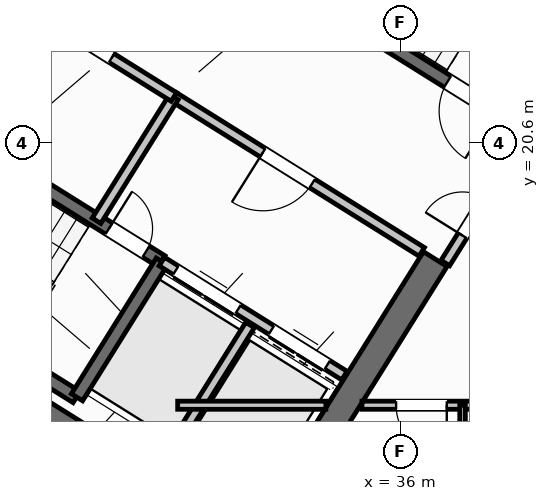
"""IFC4 building model, lengths in metres.
Left out: names, types, materials, properties, quantities, classifications, styles, units other than length and angle.
Written with IfcOpenShell. Run it as: python <this file> out.ifc"""

import sys

from ifc_helpers import new_model, si_unit, direction, frame, frame_2d, origin, place, context, subcontext, project, spatial, rectangle, extrude, source, transform, mapped, element, fill, save


model = new_model("IFC4")
c1 = context("Model", 3, precision=1e-05, world=origin(), true_north=direction((0.0, 1.0)))
c2 = subcontext(c1, "Body", "Model", "MODEL_VIEW")
j1 = project(units=[si_unit("LENGTHUNIT", "METRE"), si_unit("PLANEANGLEUNIT", "RADIAN")], contexts=[c1])
p1 = place(None, origin())
s1 = spatial("IfcSite", under=j1, at=p1, CompositionType="ELEMENT")
p2 = place(p1, origin())
s2 = spatial("IfcBuilding", under=s1, at=p2, CompositionType="ELEMENT")
p3 = place(p2, frame((0.0, 0.0, 165.9)))
s3 = spatial("IfcBuildingStorey", under=s2, at=p3, CompositionType="ELEMENT", Elevation=165.9)
p4 = place(p3, frame((33.366, 12.477, 0.0), z_axis=(0.0, 0.0, 1.0), x_axis=(-0.848047359947, 0.529920442413, 0.0)))
e1 = element("IfcWall", 1, at=p4, inside=s3, PredefinedType="SHEAR", context=c2, shape_type="SweptSolid", body=[
    extrude(rectangle(XDim=13.14, YDim=0.55, at=frame_2d((6.57, 0.0))), origin(), (0.0, 0.0, 1.0), 3.32),
])
p5 = place(p3, frame((36.683, 18.304, 0.0), z_axis=(0.0, 0.0, 1.0), x_axis=(-0.529896466841, -0.848062341122, 0.0)))
e2 = element("IfcWall", 2, at=p5, inside=s3, PredefinedType="SHEAR", context=c2, shape_type="SweptSolid", body=[
    extrude(rectangle(XDim=6.425, YDim=0.55, at=frame_2d((3.212, 0.0))), origin(), (0.0, 0.0, 1.0), 3.32),
])
p6 = place(p3, frame((29.268, 6.429, 0.0), z_axis=(0.0, 0.0, 1.0), x_axis=(-0.848049971435, 0.529916263149, 0.0)))
e3 = element("IfcWall", 3, at=p6, inside=s3, PredefinedType="STANDARD", context=c2, shape_type="SweptSolid", body=[
    extrude(rectangle(XDim=31.588, YDim=0.32, at=frame_2d((15.794, 0.0))), origin(), (0.0, 0.0, 1.0), 3.32),
])
p7 = place(p6, frame((16.362, 0.0, 0.0)))
e4 = element("IfcOpeningElement", 4, at=p7, cuts=e3, PredefinedType="OPENING", context=c2, shape_type="SweptSolid", body=[
    extrude(rectangle(XDim=1.2, YDim=2.15, at=frame_2d((0.6, 1.075))), frame((0.0, 0.17, 0.0), z_axis=(0.0, -1.0, 0.0), x_axis=(1.0, 0.0, 0.0)), (0.0, 0.0, 1.0), 0.34),
])
p8 = place(p6, frame((2.989, 0.0, 0.8)))
e5 = element("IfcOpeningElement", 5, at=p8, cuts=e3, PredefinedType="OPENING", context=c2, shape_type="SweptSolid", body=[
    extrude(rectangle(XDim=2.1, YDim=1.55, at=frame_2d((1.05, 0.775))), frame((0.0, 0.17, 0.0), z_axis=(0.0, -1.0, 0.0), x_axis=(1.0, 0.0, 0.0)), (0.0, 0.0, 1.0), 0.34),
])
p9 = place(p6, frame((8.359, 0.0, 0.8)))
e6 = element("IfcOpeningElement", 6, at=p9, cuts=e3, PredefinedType="OPENING", context=c2, shape_type="SweptSolid", body=[
    extrude(rectangle(XDim=2.1, YDim=1.55, at=frame_2d((1.05, 0.775))), frame((0.0, 0.17, 0.0), z_axis=(0.0, -1.0, 0.0), x_axis=(1.0, 0.0, 0.0)), (0.0, 0.0, 1.0), 0.34),
])
p10 = place(p6, frame((13.284, 0.0, 0.95)))
e7 = element("IfcOpeningElement", 7, at=p10, cuts=e3, PredefinedType="OPENING", context=c2, shape_type="SweptSolid", body=[
    extrude(rectangle(XDim=1.2, YDim=1.4, at=frame_2d((0.6, 0.7))), frame((0.0, 0.17, 0.0), z_axis=(0.0, -1.0, 0.0), x_axis=(1.0, 0.0, 0.0)), (0.0, 0.0, 1.0), 0.34),
])
p11 = place(p6, frame((20.39, 0.0, 0.95)))
e8 = element("IfcOpeningElement", 8, at=p11, cuts=e3, PredefinedType="OPENING", context=c2, shape_type="SweptSolid", body=[
    extrude(rectangle(XDim=1.2, YDim=1.4, at=frame_2d((0.6, 0.7))), frame((0.0, 0.17, 0.0), z_axis=(0.0, -1.0, 0.0), x_axis=(1.0, 0.0, 0.0)), (0.0, 0.0, 1.0), 0.34),
])
p12 = place(p6, frame((23.715, 0.0, 1.0)))
e9 = element("IfcOpeningElement", 9, at=p12, cuts=e3, PredefinedType="OPENING", context=c2, shape_type="SweptSolid", body=[
    extrude(rectangle(XDim=0.9, YDim=1.25, at=frame_2d((0.45, 0.625))), frame((0.0, 0.17, 0.0), z_axis=(0.0, -1.0, 0.0), x_axis=(1.0, 0.0, 0.0)), (0.0, 0.0, 1.0), 0.34),
])
p13 = place(p6, frame((26.106, 0.0, 0.85)))
e10 = element("IfcOpeningElement", 10, at=p13, cuts=e3, PredefinedType="OPENING", context=c2, shape_type="SweptSolid", body=[
    extrude(rectangle(XDim=1.5, YDim=1.5, at=frame_2d((0.75, 0.75))), frame((0.0, 0.17, 0.0), z_axis=(0.0, -1.0, 0.0), x_axis=(1.0, 0.0, 0.0)), (0.0, 0.0, 1.0), 0.34),
])
p14 = place(p6, frame((29.068, 0.0, 0.85)))
e11 = element("IfcOpeningElement", 11, at=p14, cuts=e3, PredefinedType="OPENING", context=c2, shape_type="SweptSolid", body=[
    extrude(rectangle(XDim=1.8, YDim=1.5, at=frame_2d((0.9, 0.75))), frame((0.0, 0.17, 0.0), z_axis=(0.0, -1.0, 0.0), x_axis=(1.0, 0.0, 0.0)), (0.0, 0.0, 1.0), 0.34),
])
p15 = place(p3, frame((29.605, 15.581, 0.0), z_axis=(0.0, 0.0, 1.0), x_axis=(-0.848036911448, 0.529937163087, 0.0)))
e12 = element("IfcWall", 12, at=p15, inside=s3, PredefinedType="SHEAR", context=c2, shape_type="SweptSolid", body=[
    extrude(rectangle(XDim=7.46, YDim=0.26, at=frame_2d((3.73, 0.0))), origin(), (0.0, 0.0, 1.0), 3.32),
])
p16 = place(p3, frame((31.28, 18.261, 0.0), z_axis=(0.0, 0.0, 1.0), x_axis=(-0.848051618787, 0.529913626805, 0.0)))
e13 = element("IfcWall", 13, at=p16, inside=s3, PredefinedType="SHEAR", context=c2, shape_type="SweptSolid", body=[
    extrude(rectangle(XDim=7.46, YDim=0.26, at=frame_2d((3.73, 0.0))), origin(), (0.0, 0.0, 1.0), 3.32),
])
p17 = place(p16, frame((0.36, 0.0, 0.0)))
e14 = element("IfcOpeningElement", 14, at=p17, cuts=e13, PredefinedType="OPENING", context=c2, shape_type="SweptSolid", body=[
    extrude(rectangle(XDim=0.86, YDim=2.05, at=frame_2d((0.43, 1.025))), frame((0.0, 0.14, 0.0), z_axis=(0.0, -1.0, 0.0), x_axis=(1.0, 0.0, 0.0)), (0.0, 0.0, 1.0), 0.28),
])
p18 = place(p3, frame((31.288, 18.256, 0.0), z_axis=(0.0, 0.0, 1.0), x_axis=(-0.529943379326, -0.848033026897, 0.0)))
e15 = element("IfcWall", 15, at=p18, inside=s3, PredefinedType="SHEAR", context=c2, shape_type="SweptSolid", body=[
    extrude(rectangle(XDim=3.16, YDim=0.26, at=frame_2d((1.58, 0.0))), origin(), (0.0, 0.0, 1.0), 3.32),
])
p19 = place(p3, frame((38.046, 21.108, 0.0), z_axis=(0.0, 0.0, 1.0), x_axis=(-0.848054434086, 0.529909121291, 0.0)))
e16 = element("IfcWall", 16, at=p19, inside=s3, PredefinedType="SHEAR", context=c2, shape_type="SweptSolid", body=[
    extrude(rectangle(XDim=7.33, YDim=0.26, at=frame_2d((3.665, 0.0))), origin(), (0.0, 0.0, 1.0), 3.32),
])
p20 = place(p19, frame((0.22, 0.0, 0.0)))
e17 = element("IfcOpeningElement", 17, at=p20, cuts=e16, PredefinedType="OPENING", context=c2, shape_type="SweptSolid", body=[
    extrude(rectangle(XDim=1.1, YDim=2.1, at=frame_2d((0.55, 1.05))), frame((0.0, 0.14, 0.0), z_axis=(0.0, -1.0, 0.0), x_axis=(1.0, 0.0, 0.0)), (0.0, 0.0, 1.0), 0.28),
])
p21 = place(p3, frame((34.891, 16.005, 0.0), z_axis=(0.0, 0.0, 1.0), x_axis=(-0.848062873452, 0.529895614884, 0.0)))
e18 = element("IfcWall", 18, at=p21, inside=s3, PredefinedType="STANDARD", context=c2, shape_type="SweptSolid", body=[
    extrude(rectangle(XDim=4.248, YDim=0.2, at=frame_2d((2.124, 0.0))), origin(), (0.0, 0.0, 1.0), 3.31),
])
p22 = place(p21, frame((0.398, 0.0, 0.0)))
e19 = element("IfcOpeningElement", 19, at=p22, cuts=e18, PredefinedType="OPENING", context=c2, shape_type="SweptSolid", body=[
    extrude(rectangle(XDim=1.3, YDim=2.2, at=frame_2d((0.65, 1.1))), frame((0.0, 0.11, 0.0), z_axis=(0.0, -1.0, 0.0), x_axis=(1.0, 0.0, 0.0)), (0.0, 0.0, 1.0), 0.22),
])
p23 = place(p21, frame((2.473, 0.0, 0.0)))
e20 = element("IfcOpeningElement", 20, at=p23, cuts=e18, PredefinedType="OPENING", context=c2, shape_type="SweptSolid", body=[
    extrude(rectangle(XDim=1.45, YDim=2.25, at=frame_2d((0.725, 1.125))), frame((0.0, 0.11, 0.0), z_axis=(0.0, -1.0, 0.0), x_axis=(1.0, 0.0, 0.0)), (0.0, 0.0, 1.0), 0.22),
])
p24 = place(p3, frame((36.417, 18.447, 0.0), z_axis=(0.0, 0.0, 1.0), x_axis=(-0.848064879198, 0.529892404805, 0.0)))
e21 = element("IfcWall", 21, at=p24, inside=s3, PredefinedType="STANDARD", context=c2, shape_type="SweptSolid", body=[
    extrude(rectangle(XDim=5.768, YDim=0.2, at=frame_2d((2.884, 0.0))), origin(), (0.0, 0.0, 1.0), 3.31),
])
p25 = place(p24, frame((2.548, 0.0, 0.0)))
e22 = element("IfcOpeningElement", 22, at=p25, cuts=e21, PredefinedType="OPENING", context=c2, shape_type="SweptSolid", body=[
    extrude(rectangle(XDim=1.15, YDim=2.1, at=frame_2d((0.575, 1.05))), frame((0.0, 0.11, 0.0), z_axis=(0.0, -1.0, 0.0), x_axis=(1.0, 0.0, 0.0)), (0.0, 0.0, 1.0), 0.22),
])
p26 = place(p3, frame((33.029, 17.003, 0.0), z_axis=(0.0, 0.0, 1.0), x_axis=(-0.529916267533, -0.848049968695, 0.0)))
e23 = element("IfcWall", 23, at=p26, inside=s3, PredefinedType="STANDARD", context=c2, shape_type="SweptSolid", body=[
    extrude(rectangle(XDim=2.92, YDim=0.2, at=frame_2d((1.46, 0.0))), origin(), (0.0, 0.0, 1.0), 3.31),
])
p27 = place(p3, frame((31.525, 21.504, 0.0), z_axis=(0.0, 0.0, 1.0), x_axis=(-0.529907497854, -0.848055448493, 0.0)))
e24 = element("IfcWall", 24, at=p27, inside=s3, PredefinedType="STANDARD", context=c2, shape_type="SweptSolid", body=[
    extrude(rectangle(XDim=2.88, YDim=0.2, at=frame_2d((1.44, 0.0))), origin(), (0.0, 0.0, 1.0), 3.31),
])
p28 = place(p3, frame((31.525, 21.504, 0.0), z_axis=(0.0, 0.0, 1.0), x_axis=(-0.848040211232, 0.529931882541, 0.0)))
e25 = element("IfcWall", 25, at=p28, inside=s3, PredefinedType="STANDARD", context=c2, shape_type="SweptSolid", body=[
    extrude(rectangle(XDim=6.218, YDim=0.2, at=frame_2d((3.109, 0.0))), origin(), (0.0, 0.0, 1.0), 3.31),
])
p29 = place(p28, frame((4.4, 0.0, 0.0)))
e26 = element("IfcOpeningElement", 26, at=p29, cuts=e25, PredefinedType="OPENING", context=c2, shape_type="SweptSolid", body=[
    extrude(rectangle(XDim=0.86, YDim=2.05, at=frame_2d((0.43, 1.025))), frame((0.0, 0.11, 0.0), z_axis=(0.0, -1.0, 0.0), x_axis=(1.0, 0.0, 0.0)), (0.0, 0.0, 1.0), 0.22),
])
p30 = place(p28, frame((1.45, 0.0, 0.0)))
e27 = element("IfcOpeningElement", 27, at=p30, cuts=e25, PredefinedType="OPENING", context=c2, shape_type="SweptSolid", body=[
    extrude(rectangle(XDim=0.86, YDim=2.05, at=frame_2d((0.43, 1.025))), frame((0.0, 0.11, 0.0), z_axis=(0.0, -1.0, 0.0), x_axis=(1.0, 0.0, 0.0)), (0.0, 0.0, 1.0), 0.22),
])
p31 = place(p3, frame((32.164, 10.374, 0.0), z_axis=(0.0, 0.0, 1.0), x_axis=(-0.848044107957, 0.529925646633, 0.0)))
e28 = element("IfcWall", 28, at=p31, inside=s3, PredefinedType="PARTITIONING", context=c2, shape_type="SweptSolid", body=[
    extrude(rectangle(XDim=15.57, YDim=0.16, at=frame_2d((7.785, 0.0))), origin(), (0.0, 0.0, 1.0), 3.31),
])
p32 = place(p31, frame((10.83, 0.0, 0.0)))
e29 = element("IfcOpeningElement", 29, at=p32, cuts=e28, PredefinedType="OPENING", context=c2, shape_type="SweptSolid", body=[
    extrude(rectangle(XDim=1.0, YDim=2.1, at=frame_2d((0.5, 1.05))), frame((0.0, 0.09, 0.0), z_axis=(0.0, -1.0, 0.0), x_axis=(1.0, 0.0, 0.0)), (0.0, 0.0, 1.0), 0.18),
])
p33 = place(p3, frame((29.72, 8.859, 0.0), z_axis=(0.0, 0.0, 1.0), x_axis=(-0.848049134363, 0.529917602752, 0.0)))
e30 = element("IfcWall", 30, at=p33, inside=s3, PredefinedType="PLUMBINGWALL", context=c2, shape_type="SweptSolid", body=[
    extrude(rectangle(XDim=14.3, YDim=0.14, at=frame_2d((7.15, 0.0))), origin(), (0.0, 0.0, 1.0), 3.31),
])
p34 = place(p33, frame((9.57, 0.0, 0.0)))
e31 = element("IfcOpeningElement", 31, at=p34, cuts=e30, PredefinedType="OPENING", context=c2, shape_type="SweptSolid", body=[
    extrude(rectangle(XDim=0.92, YDim=2.08, at=frame_2d((0.46, 1.04))), frame((0.0, 0.08, 0.0), z_axis=(0.0, -1.0, 0.0), x_axis=(1.0, 0.0, 0.0)), (0.0, 0.0, 1.0), 0.16),
])
p35 = place(p3, frame((38.451, 20.737, 0.0), z_axis=(0.0, 0.0, 1.0), x_axis=(-0.529924799939, -0.848044637038, 0.0)))
e32 = element("IfcWall", 32, at=p35, inside=s3, PredefinedType="STANDARD", context=c2, shape_type="SweptSolid", body=[
    extrude(rectangle(XDim=2.96, YDim=0.2, at=frame_2d((1.48, 0.0))), origin(), (0.0, 0.0, 1.0), 3.31),
])
p36 = place(p35, frame((1.46, 0.0, 0.0)))
e33 = element("IfcOpeningElement", 33, at=p36, cuts=e32, PredefinedType="OPENING", context=c2, shape_type="SweptSolid", body=[
    extrude(rectangle(XDim=0.86, YDim=2.05, at=frame_2d((0.43, 1.025))), frame((0.0, 0.11, 0.0), z_axis=(0.0, -1.0, 0.0), x_axis=(1.0, 0.0, 0.0)), (0.0, 0.0, 1.0), 0.22),
])
p37 = place(p3, frame((31.6, 15.42, 0.0), z_axis=(0.0, 0.0, 1.0), x_axis=(1.0, 0.0, 0.0)))
e34 = element("IfcWall", 34, at=p37, inside=s3, PredefinedType="PARTITIONING", context=c2, shape_type="SweptSolid", body=[
    extrude(rectangle(XDim=2.925, YDim=0.16, at=frame_2d((1.462, 0.0))), origin(), (0.0, 0.0, 1.0), 3.31),
])
p38 = place(p3, frame((35.237, 15.42, 0.0), z_axis=(0.0, 0.0, 1.0), x_axis=(1.0, 0.0, 0.0)))
e35 = element("IfcWall", 35, at=p38, inside=s3, PredefinedType="PARTITIONING", context=c2, shape_type="SweptSolid", body=[
    extrude(rectangle(XDim=15.432, YDim=0.16, at=frame_2d((7.716, 0.0))), origin(), (0.0, 0.0, 1.0), 3.31),
])
p39 = place(p38, frame((0.674, 0.0, 0.0)))
e36 = element("IfcOpeningElement", 36, at=p39, cuts=e35, PredefinedType="OPENING", context=c2, shape_type="SweptSolid", body=[
    extrude(rectangle(XDim=1.0, YDim=2.1, at=frame_2d((0.5, 1.05))), frame((0.0, 0.09, 0.0), z_axis=(0.0, -1.0, 0.0), x_axis=(1.0, 0.0, 0.0)), (0.0, 0.0, 1.0), 0.18),
])
p40 = place(p38, frame((9.094, 0.0, 0.0)))
e37 = element("IfcOpeningElement", 37, at=p40, cuts=e35, PredefinedType="OPENING", context=c2, shape_type="SweptSolid", body=[
    extrude(rectangle(XDim=1.0, YDim=2.1, at=frame_2d((0.5, 1.05))), frame((0.0, 0.09, 0.0), z_axis=(0.0, -1.0, 0.0), x_axis=(1.0, 0.0, 0.0)), (0.0, 0.0, 1.0), 0.18),
])
p41 = place(p3, frame((37.222, 1.96, 0.0), z_axis=(0.0, 0.0, 1.0), x_axis=(0.0, 1.0, 0.0)))
e38 = element("IfcWall", 38, at=p41, inside=s3, PredefinedType="PARTITIONING", context=c2, shape_type="SweptSolid", body=[
    extrude(rectangle(XDim=13.46, YDim=0.11, at=frame_2d((6.73, 0.0))), origin(), (0.0, 0.0, 1.0), 3.31),
])
p42 = place(p41, frame((5.2, 0.0, 0.0)))
e39 = element("IfcOpeningElement", 39, at=p42, cuts=e38, PredefinedType="OPENING", context=c2, shape_type="SweptSolid", body=[
    extrude(rectangle(XDim=0.92, YDim=2.08, at=frame_2d((0.46, 1.04))), frame((0.0, 0.065, 0.0), z_axis=(0.0, -1.0, 0.0), x_axis=(1.0, 0.0, 0.0)), (0.0, 0.0, 1.0), 0.13),
])
p43 = place(p41, frame((10.45, 0.0, 0.0)))
e40 = element("IfcOpeningElement", 40, at=p43, cuts=e38, PredefinedType="OPENING", context=c2, shape_type="SweptSolid", body=[
    extrude(rectangle(XDim=0.88, YDim=2.08, at=frame_2d((0.44, 1.04))), frame((0.0, 0.065, 0.0), z_axis=(0.0, -1.0, 0.0), x_axis=(1.0, 0.0, 0.0)), (0.0, 0.0, 1.0), 0.13),
])
m1 = source(origin(), c2, "Body", "SweptSolid", [
    extrude(rectangle(XDim=0.86, YDim=2.05, at=frame_2d((0.43, 1.025))), frame((0.0, 0.025, 0.0), z_axis=(0.0, -1.0, 0.0), x_axis=(1.0, 0.0, 0.0)), (0.0, 0.0, 1.0), 0.05),
])
p44 = place(p17, frame((0.86, 0.0, 0.0), z_axis=(0.0, 0.0, 1.0), x_axis=(-1.0, 0.0, 0.0)))
e41 = element("IfcDoor", 41, at=p44, inside=s3, OperationType="SINGLE_SWING_LEFT", PredefinedType="DOOR", context=c2, shape_type="MappedRepresentation", body=[
    mapped(m1, transform((0.0, 0.0, 0.0), scale=1.0)),
])
fill(e14, e41)
m2 = source(origin(), c2, "Body", "SweptSolid", [
    extrude(rectangle(XDim=1.1, YDim=2.1, at=frame_2d((0.55, 1.05))), frame((0.0, 0.025, 0.0), z_axis=(0.0, -1.0, 0.0), x_axis=(1.0, 0.0, 0.0)), (0.0, 0.0, 1.0), 0.05),
])
p45 = place(p20, origin())
e42 = element("IfcDoor", 42, at=p45, inside=s3, OperationType="SINGLE_SWING_LEFT", PredefinedType="DOOR", context=c2, shape_type="MappedRepresentation", body=[
    mapped(m2, transform((0.0, 0.0, 0.0), scale=1.0)),
])
fill(e17, e42)
m3 = source(origin(), c2, "Body", "SweptSolid", [
    extrude(rectangle(XDim=1.15, YDim=2.1, at=frame_2d((0.575, 1.05))), frame((0.0, 0.025, 0.0), z_axis=(0.0, -1.0, 0.0), x_axis=(1.0, 0.0, 0.0)), (0.0, 0.0, 1.0), 0.05),
])
p46 = place(p25, origin())
e43 = element("IfcDoor", 43, at=p46, inside=s3, OperationType="SINGLE_SWING_RIGHT", PredefinedType="DOOR", context=c2, shape_type="MappedRepresentation", body=[
    mapped(m3, transform((0.0, 0.0, 0.0), scale=1.0)),
])
fill(e22, e43)
m4 = source(origin(), c2, "Body", "SweptSolid", [
    extrude(rectangle(XDim=1.3, YDim=2.2, at=frame_2d((0.65, 1.1))), frame((0.0, 0.025, 0.0), z_axis=(0.0, -1.0, 0.0), x_axis=(1.0, 0.0, 0.0)), (0.0, 0.0, 1.0), 0.05),
])
p47 = place(p22, origin())
e44 = element("IfcDoor", 44, at=p47, inside=s3, OperationType="DOUBLE_DOOR_SLIDING", PredefinedType="DOOR", context=c2, shape_type="MappedRepresentation", body=[
    mapped(m4, transform((0.0, 0.0, 0.0), scale=1.0)),
])
fill(e19, e44)
m5 = source(origin(), c2, "Body", "SweptSolid", [
    extrude(rectangle(XDim=1.45, YDim=2.25, at=frame_2d((0.725, 1.125))), frame((0.0, 0.025, 0.0), z_axis=(0.0, -1.0, 0.0), x_axis=(1.0, 0.0, 0.0)), (0.0, 0.0, 1.0), 0.05),
])
p48 = place(p23, origin())
e45 = element("IfcDoor", 45, at=p48, inside=s3, OperationType="DOUBLE_DOOR_SLIDING", PredefinedType="DOOR", context=c2, shape_type="MappedRepresentation", body=[
    mapped(m5, transform((0.0, 0.0, 0.0), scale=1.0)),
])
fill(e20, e45)
p49 = place(p30, frame((0.86, 0.0, 0.0), z_axis=(0.0, 0.0, 1.0), x_axis=(-1.0, 0.0, 0.0)))
e46 = element("IfcDoor", 46, at=p49, inside=s3, OperationType="SINGLE_SWING_RIGHT", PredefinedType="DOOR", context=c2, shape_type="MappedRepresentation", body=[
    mapped(m1, transform((0.0, 0.0, 0.0), scale=1.0)),
])
fill(e27, e46)
p50 = place(p36, frame((0.86, 0.0, 0.0), z_axis=(0.0, 0.0, 1.0), x_axis=(-1.0, 0.0, 0.0)))
e47 = element("IfcDoor", 47, at=p50, inside=s3, OperationType="SINGLE_SWING_LEFT", PredefinedType="DOOR", context=c2, shape_type="MappedRepresentation", body=[
    mapped(m1, transform((0.0, 0.0, 0.0), scale=1.0)),
])
fill(e33, e47)
m6 = source(origin(), c2, "Body", "SweptSolid", [
    extrude(rectangle(XDim=1.0, YDim=2.1, at=frame_2d((0.5, 1.05))), frame((0.0, 0.025, 0.0), z_axis=(0.0, -1.0, 0.0), x_axis=(1.0, 0.0, 0.0)), (0.0, 0.0, 1.0), 0.05),
])
p51 = place(p39, frame((1.0, 0.0, 0.0), z_axis=(0.0, 0.0, 1.0), x_axis=(-1.0, 0.0, 0.0)))
e48 = element("IfcDoor", 48, at=p51, inside=s3, OperationType="SINGLE_SWING_LEFT", PredefinedType="DOOR", context=c2, shape_type="MappedRepresentation", body=[
    mapped(m6, transform((0.0, 0.0, 0.0), scale=1.0)),
])
fill(e36, e48)
save(model, sys.argv[1])
